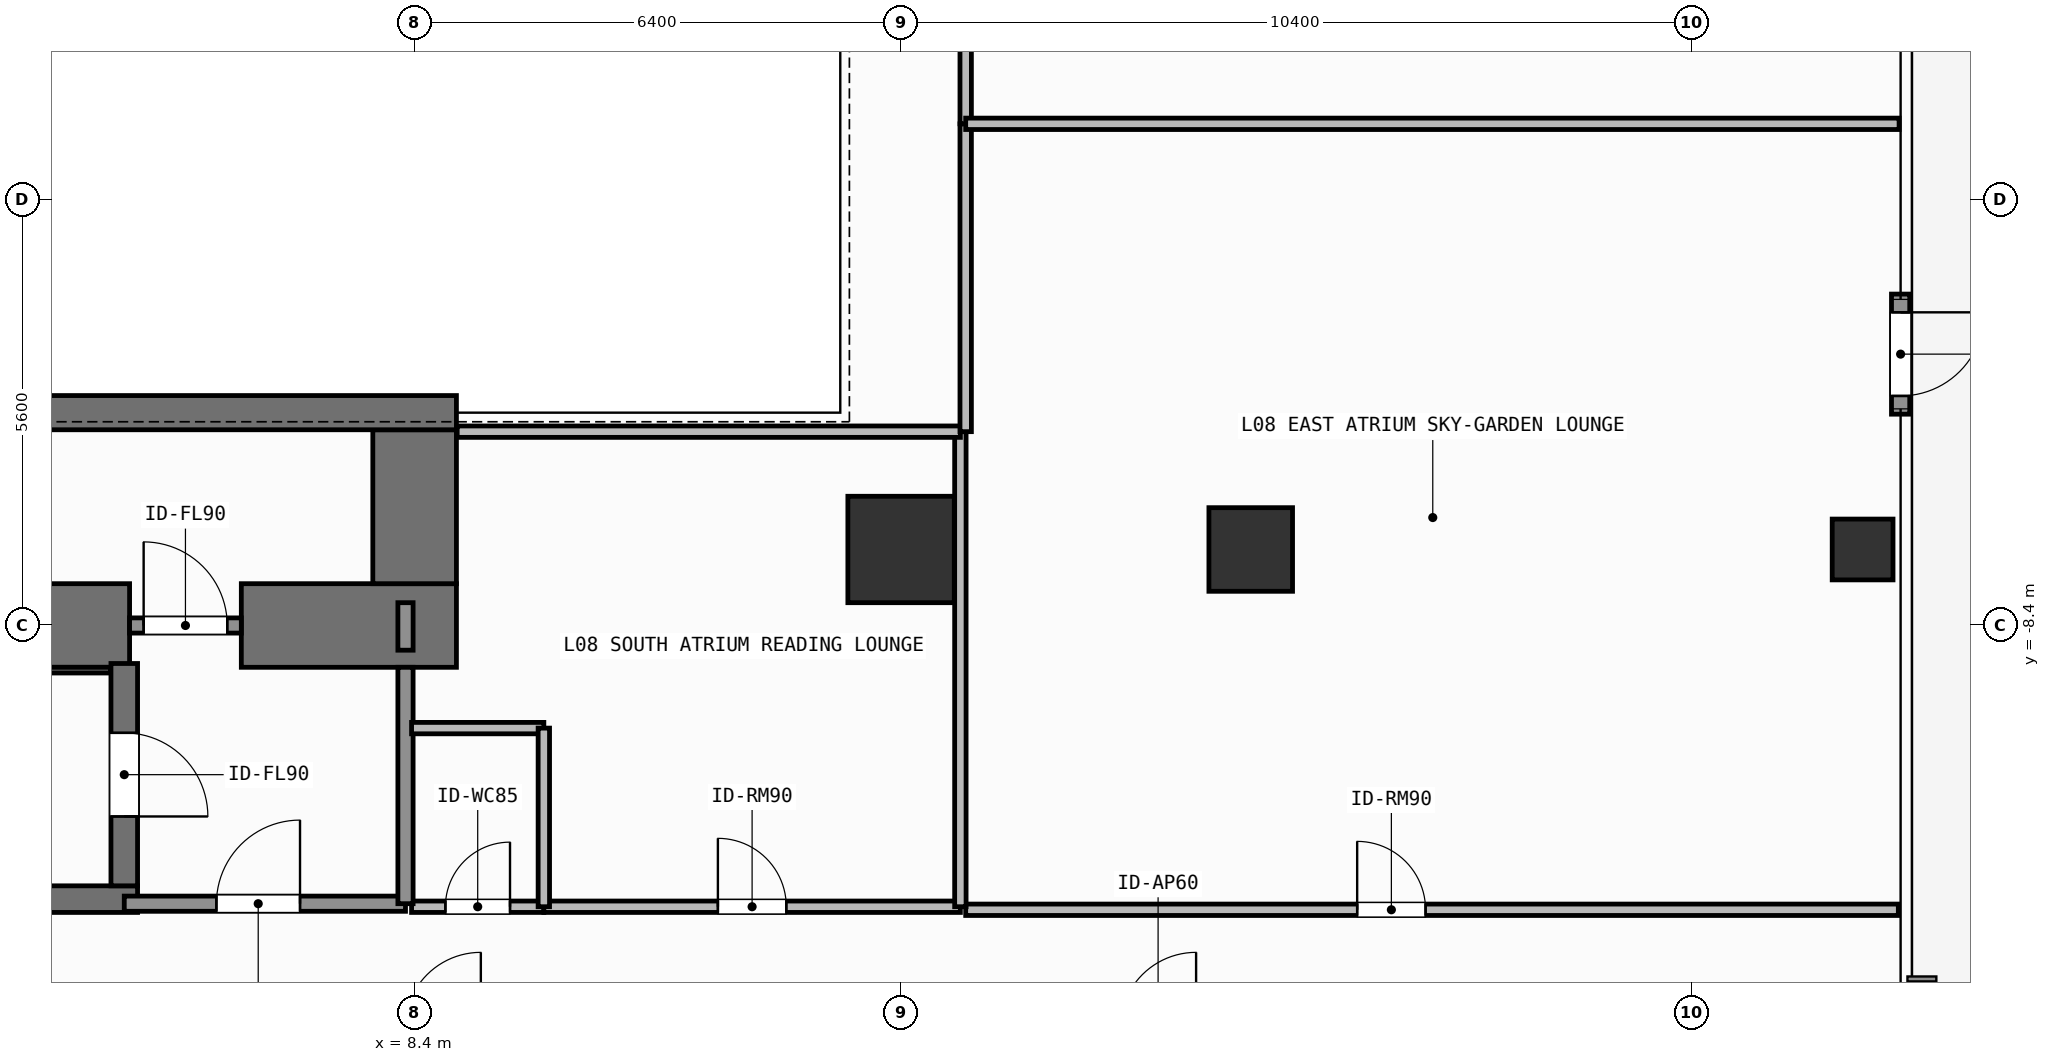
"""IFC4 building model, lengths in metres.
Left out: names, types, materials, properties, quantities, classifications, styles, units other than length and angle.
Written with IfcOpenShell. Run it as: python <this file> out.ifc"""

import sys

from ifc_helpers import new_model, si_unit, direction, frame, frame_2d, origin, origin_2d, place, context, subcontext, project, spatial, rectangle, hollow_rectangle, extrude, element, fill, save


model = new_model("IFC4")
c1 = context("Model", 3, precision=1e-05, world=origin(), true_north=direction((0.0, 1.0)))
c2 = subcontext(c1, "Body", "Model", "MODEL_VIEW")
j1 = project(units=[si_unit("LENGTHUNIT", "METRE"), si_unit("PLANEANGLEUNIT", "RADIAN")], contexts=[c1])
p1 = place(None, origin())
s1 = spatial("IfcSite", under=j1, at=p1, CompositionType="ELEMENT")
p2 = place(p1, origin())
s2 = spatial("IfcBuilding", under=s1, at=p2, CompositionType="ELEMENT")
p3 = place(p2, frame((0.0, 0.0, 30.6)))
s3 = spatial("IfcBuildingStorey", under=s2, at=p3, CompositionType="ELEMENT", Elevation=30.6)
p4 = place(p3, frame((-2.62, -8.4, 0.0), z_axis=(0.0, 0.0, 1.0), x_axis=(1.0, 0.0, 0.0)))
e1 = element("IfcWall", 1, at=p4, inside=s3, PredefinedType="SHEAR", context=c2, shape_type="SweptSolid", body=[
    extrude(rectangle(XDim=7.27, YDim=1.1, at=frame_2d((3.635, 0.0))), origin(), (0.0, 0.0, 1.0), 3.9),
])
p5 = place(p3, frame((6.12, -8.4, 0.0), z_axis=(0.0, 0.0, 1.0), x_axis=(1.0, 0.0, 0.0)))
e2 = element("IfcWall", 2, at=p5, inside=s3, PredefinedType="SHEAR", context=c2, shape_type="SweptSolid", body=[
    extrude(rectangle(XDim=2.83, YDim=1.1, at=frame_2d((1.415, 0.0))), origin(), (0.0, 0.0, 1.0), 3.9),
])
p6 = place(p3, frame((8.4, -7.85, 0.0), z_axis=(0.0, 0.0, 1.0), x_axis=(0.0, 1.0, 0.0)))
e3 = element("IfcWall", 3, at=p6, inside=s3, PredefinedType="SHEAR", context=c2, shape_type="SweptSolid", body=[
    extrude(rectangle(XDim=2.025, YDim=1.1, at=frame_2d((1.013, 0.0))), origin(), (0.0, 0.0, 1.0), 3.9),
])
p7 = place(p3, frame((3.045, -5.6, 0.0), z_axis=(0.0, 0.0, 1.0), x_axis=(1.0, 0.0, 0.0)))
e4 = element("IfcWall", 4, at=p7, inside=s3, PredefinedType="SHEAR", context=c2, shape_type="SweptSolid", body=[
    extrude(rectangle(XDim=5.905, YDim=0.45, at=frame_2d((2.953, 0.0))), origin(), (0.0, 0.0, 1.0), 3.9),
])
p8 = place(p3, frame((-2.555, -12.0, 0.0), z_axis=(0.0, 0.0, 1.0), x_axis=(1.0, 0.0, 0.0)))
e5 = element("IfcWall", 5, at=p8, inside=s3, PredefinedType="SHEAR", context=c2, shape_type="SweptSolid", body=[
    extrude(rectangle(XDim=7.31, YDim=0.35, at=frame_2d((3.655, 0.0))), origin(), (0.0, 0.0, 1.0), 3.9),
])
p9 = place(p3, frame((-2.2, -8.988, 0.0), z_axis=(0.0, 0.0, 1.0), x_axis=(1.0, 0.0, 0.0)))
e6 = element("IfcWall", 6, at=p9, inside=s3, PredefinedType="SHEAR", context=c2, shape_type="SweptSolid", body=[
    extrude(rectangle(XDim=6.6, YDim=0.075, at=frame_2d((3.3, 0.0))), origin(), (0.0, 0.0, 1.0), 3.9),
])
p10 = place(p3, frame((4.58, -8.9, 0.0), z_axis=(0.0, 0.0, 1.0), x_axis=(0.0, -1.0, 0.0)))
e7 = element("IfcWall", 7, at=p10, inside=s3, PredefinedType="SHEAR", context=c2, shape_type="SweptSolid", body=[
    extrude(rectangle(XDim=2.925, YDim=0.35, at=frame_2d((1.462, 0.0))), origin(), (0.0, 0.0, 1.0), 3.9),
])
p11 = place(p10, frame((0.913, 0.0, 0.0)))
e8 = element("IfcOpeningElement", 8, at=p11, cuts=e7, PredefinedType="OPENING", context=c2, shape_type="SweptSolid", body=[
    extrude(rectangle(XDim=1.1, YDim=2.15, at=frame_2d((0.55, 1.075))), frame((0.0, 0.185, 0.0), z_axis=(0.0, -1.0, 0.0), x_axis=(1.0, 0.0, 0.0)), (0.0, 0.0, 1.0), 0.37),
])
p12 = place(p3, frame((14.8, -7.4, 0.0), z_axis=(0.0, 0.0, 1.0), x_axis=(1.0, 0.0, 0.0)))
e9 = element("IfcColumn", 9, at=p12, inside=s3, PredefinedType="COLUMN", context=c2, shape_type="SweptSolid", body=[
    extrude(rectangle(XDim=1.4, YDim=1.4, at=origin_2d()), origin(), (0.0, 0.0, 1.0), 3.9),
])
p13 = place(p3, frame((19.4, -7.4, 0.0), z_axis=(0.0, 0.0, 1.0), x_axis=(1.0, 0.0, 0.0)))
e10 = element("IfcColumn", 10, at=p13, inside=s3, PredefinedType="COLUMN", context=c2, shape_type="SweptSolid", body=[
    extrude(rectangle(XDim=1.1, YDim=1.1, at=origin_2d()), origin(), (0.0, 0.0, 1.0), 3.9),
])
p14 = place(p3, frame((27.45, -7.4, 0.0), z_axis=(0.0, 0.0, 1.0), x_axis=(1.0, 0.0, 0.0)))
e11 = element("IfcColumn", 11, at=p14, inside=s3, PredefinedType="COLUMN", context=c2, shape_type="SweptSolid", body=[
    extrude(hollow_rectangle(XDim=0.8, YDim=0.8, WallThickness=0.036, at=origin_2d()), origin(), (0.0, 0.0, 1.0), 3.9),
])
p15 = place(p3, frame((27.95, -4.04, 0.0), z_axis=(0.0, 0.0, 1.0), x_axis=(0.0, -1.0, 0.0)))
e12 = element("IfcWall", 12, at=p15, inside=s3, PredefinedType="SOLIDWALL", context=c2, shape_type="SweptSolid", body=[
    extrude(rectangle(XDim=1.58, YDim=0.24, at=frame_2d((0.79, 0.0))), origin(), (0.0, 0.0, 1.0), 3.68),
])
p16 = place(p15, frame((0.24, 0.0, 0.0)))
e13 = element("IfcOpeningElement", 13, at=p16, cuts=e12, PredefinedType="OPENING", context=c2, shape_type="SweptSolid", body=[
    extrude(rectangle(XDim=1.1, YDim=2.2, at=frame_2d((0.55, 1.1))), frame((0.0, 0.13, 0.0), z_axis=(0.0, -1.0, 0.0), x_axis=(1.0, 0.0, 0.0)), (0.0, 0.0, 1.0), 0.26),
])
p17 = place(p3, frame((4.58, -12.06, 0.0), z_axis=(0.0, 0.0, 1.0), x_axis=(1.0, 0.0, 0.0)))
e14 = element("IfcWall", 14, at=p17, inside=s3, PredefinedType="SOLIDWALL", context=c2, shape_type="SweptSolid", body=[
    extrude(rectangle(XDim=3.7, YDim=0.2, at=frame_2d((1.85, 0.0))), origin(), (0.0, 0.0, 1.0), 3.68),
])
p18 = place(p17, frame((1.212, 0.0, 0.0)))
e15 = element("IfcOpeningElement", 15, at=p18, cuts=e14, PredefinedType="OPENING", context=c2, shape_type="SweptSolid", body=[
    extrude(rectangle(XDim=1.1, YDim=2.15, at=frame_2d((0.55, 1.075))), frame((0.0, 0.11, 0.0), z_axis=(0.0, -1.0, 0.0), x_axis=(1.0, 0.0, 0.0)), (0.0, 0.0, 1.0), 0.22),
])
p19 = place(p3, frame((4.65, -8.4, 0.0), z_axis=(0.0, 0.0, 1.0), x_axis=(1.0, 0.0, 0.0)))
e16 = element("IfcWall", 16, at=p19, inside=s3, PredefinedType="SOLIDWALL", context=c2, shape_type="SweptSolid", body=[
    extrude(rectangle(XDim=1.47, YDim=0.2, at=frame_2d((0.735, 0.0))), origin(), (0.0, 0.0, 1.0), 2.72),
])
p20 = place(p19, frame((0.185, 0.0, 0.0)))
e17 = element("IfcOpeningElement", 17, at=p20, cuts=e16, PredefinedType="OPENING", context=c2, shape_type="SweptSolid", body=[
    extrude(rectangle(XDim=1.1, YDim=2.15, at=frame_2d((0.55, 1.075))), frame((0.0, 0.11, 0.0), z_axis=(0.0, -1.0, 0.0), x_axis=(1.0, 0.0, 0.0)), (0.0, 0.0, 1.0), 0.22),
])
p21 = place(p3, frame((8.36, -12.1, 0.0), z_axis=(0.0, 0.0, 1.0), x_axis=(1.0, 0.0, 0.0)))
e18 = element("IfcWall", 18, at=p21, inside=s3, PredefinedType="PARTITIONING", context=c2, shape_type="SweptSolid", body=[
    extrude(rectangle(XDim=1.74, YDim=0.15, at=frame_2d((0.87, 0.0))), origin(), (0.0, 0.0, 1.0), 3.68),
])
p22 = place(p21, frame((0.445, 0.0, 0.0)))
e19 = element("IfcOpeningElement", 19, at=p22, cuts=e18, PredefinedType="OPENING", context=c2, shape_type="SweptSolid", body=[
    extrude(rectangle(XDim=0.85, YDim=2.1, at=frame_2d((0.425, 1.05))), frame((0.0, 0.085, 0.0), z_axis=(0.0, -1.0, 0.0), x_axis=(1.0, 0.0, 0.0)), (0.0, 0.0, 1.0), 0.17),
])
p23 = place(p3, frame((10.1, -12.1, 0.0), z_axis=(0.0, 0.0, 1.0), x_axis=(1.0, 0.0, 0.0)))
e20 = element("IfcWall", 20, at=p23, inside=s3, PredefinedType="PARTITIONING", context=c2, shape_type="SweptSolid", body=[
    extrude(rectangle(XDim=5.48, YDim=0.15, at=frame_2d((2.74, 0.0))), origin(), (0.0, 0.0, 1.0), 3.68),
])
p24 = place(p23, frame((2.29, 0.0, 0.0)))
e21 = element("IfcOpeningElement", 21, at=p24, cuts=e20, PredefinedType="OPENING", context=c2, shape_type="SweptSolid", body=[
    extrude(rectangle(XDim=0.9, YDim=2.1, at=frame_2d((0.45, 1.05))), frame((0.0, 0.085, 0.0), z_axis=(0.0, -1.0, 0.0), x_axis=(1.0, 0.0, 0.0)), (0.0, 0.0, 1.0), 0.17),
])
p25 = place(p3, frame((15.65, -12.14, 0.0), z_axis=(0.0, 0.0, 1.0), x_axis=(1.0, 0.0, 0.0)))
e22 = element("IfcWall", 22, at=p25, inside=s3, PredefinedType="PARTITIONING", context=c2, shape_type="SweptSolid", body=[
    extrude(rectangle(XDim=12.27, YDim=0.15, at=frame_2d((6.135, 0.0))), origin(), (0.0, 0.0, 1.0), 3.68),
])
p26 = place(p25, frame((5.15, 0.0, 0.0)))
e23 = element("IfcOpeningElement", 23, at=p26, cuts=e22, PredefinedType="OPENING", context=c2, shape_type="SweptSolid", body=[
    extrude(rectangle(XDim=0.9, YDim=2.1, at=frame_2d((0.45, 1.05))), frame((0.0, 0.085, 0.0), z_axis=(0.0, -1.0, 0.0), x_axis=(1.0, 0.0, 0.0)), (0.0, 0.0, 1.0), 0.17),
])
p27 = place(p3, frame((8.28, -12.06, 0.0), z_axis=(0.0, 0.0, 1.0), x_axis=(0.0, 1.0, 0.0)))
e24 = element("IfcWall", 24, at=p27, inside=s3, PredefinedType="SOLIDWALL", context=c2, shape_type="SweptSolid", body=[
    extrude(rectangle(XDim=3.11, YDim=0.2, at=frame_2d((1.555, 0.0))), origin(), (0.0, 0.0, 1.0), 3.68),
])
p28 = place(p3, frame((8.28, -8.725, 0.0), z_axis=(0.0, 0.0, 1.0), x_axis=(0.0, 1.0, 0.0)))
e25 = element("IfcWall", 25, at=p28, inside=s3, PredefinedType="SOLIDWALL", context=c2, shape_type="SweptSolid", body=[
    extrude(rectangle(XDim=0.625, YDim=0.2, at=frame_2d((0.312, 0.0))), origin(), (0.0, 0.0, 1.0), 3.68),
])
p29 = place(p3, frame((8.36, -9.75, 0.0), z_axis=(0.0, 0.0, 1.0), x_axis=(1.0, 0.0, 0.0)))
e26 = element("IfcWall", 26, at=p29, inside=s3, PredefinedType="PARTITIONING", context=c2, shape_type="SweptSolid", body=[
    extrude(rectangle(XDim=1.74, YDim=0.15, at=frame_2d((0.87, 0.0))), origin(), (0.0, 0.0, 1.0), 3.68),
])
p30 = place(p3, frame((10.1, -12.1, 0.0), z_axis=(0.0, 0.0, 1.0), x_axis=(0.0, 1.0, 0.0)))
e27 = element("IfcWall", 27, at=p30, inside=s3, PredefinedType="PARTITIONING", context=c2, shape_type="SweptSolid", body=[
    extrude(rectangle(XDim=2.35, YDim=0.15, at=frame_2d((1.175, 0.0))), origin(), (0.0, 0.0, 1.0), 3.68),
])
p31 = place(p3, frame((15.58, -12.1, 0.0), z_axis=(0.0, 0.0, 1.0), x_axis=(0.0, 1.0, 0.0)))
e28 = element("IfcWall", 28, at=p31, inside=s3, PredefinedType="PARTITIONING", context=c2, shape_type="SweptSolid", body=[
    extrude(rectangle(XDim=6.25, YDim=0.15, at=frame_2d((3.125, 0.0))), origin(), (0.0, 0.0, 1.0), 3.68),
])
p32 = place(p3, frame((8.96, -5.85, 0.0), z_axis=(0.0, 0.0, 1.0), x_axis=(1.0, 0.0, 0.0)))
e29 = element("IfcWall", 29, at=p32, inside=s3, PredefinedType="PARTITIONING", context=c2, shape_type="SweptSolid", body=[
    extrude(rectangle(XDim=6.62, YDim=0.15, at=frame_2d((3.31, 0.0))), origin(), (0.0, 0.0, 1.0), 3.68),
])
p33 = place(p3, frame((15.65, -5.85, 0.0), z_axis=(0.0, 0.0, 1.0), x_axis=(0.0, 1.0, 0.0)))
e30 = element("IfcWall", 30, at=p33, inside=s3, PredefinedType="PARTITIONING", context=c2, shape_type="SweptSolid", body=[
    extrude(rectangle(XDim=4.05, YDim=0.15, at=frame_2d((2.025, 0.0))), origin(), (0.0, 0.0, 1.0), 3.68),
])
p34 = place(p3, frame((15.65, -1.8, 0.0), z_axis=(0.0, 0.0, 1.0), x_axis=(0.0, 1.0, 0.0)))
e31 = element("IfcWall", 31, at=p34, inside=s3, PredefinedType="PARTITIONING", context=c2, shape_type="SweptSolid", body=[
    extrude(rectangle(XDim=7.65, YDim=0.15, at=frame_2d((3.825, 0.0))), origin(), (0.0, 0.0, 1.0), 3.68),
])
p35 = place(p3, frame((15.65, -1.8, 0.0), z_axis=(0.0, 0.0, 1.0), x_axis=(1.0, 0.0, 0.0)))
e32 = element("IfcWall", 32, at=p35, inside=s3, PredefinedType="PARTITIONING", context=c2, shape_type="SweptSolid", body=[
    extrude(rectangle(XDim=12.28, YDim=0.15, at=frame_2d((6.14, 0.0))), origin(), (0.0, 0.0, 1.0), 3.68),
])
p36 = place(p16, origin())
e33 = element("IfcDoor", 33, at=p36, inside=s3, OperationType="SINGLE_SWING_LEFT", PredefinedType="DOOR", context=c2, shape_type="SweptSolid", body=[
    extrude(rectangle(XDim=1.1, YDim=2.2, at=frame_2d((0.55, 1.1))), frame((0.0, 0.025, 0.0), z_axis=(0.0, -1.0, 0.0), x_axis=(1.0, 0.0, 0.0)), (0.0, 0.0, 1.0), 0.05),
])
fill(e13, e33)
p37 = place(p11, origin())
e34 = element("IfcDoor", 34, at=p37, inside=s3, OperationType="SINGLE_SWING_RIGHT", PredefinedType="DOOR", context=c2, shape_type="SweptSolid", body=[
    extrude(rectangle(XDim=1.1, YDim=2.15, at=frame_2d((0.55, 1.075))), frame((0.0, 0.025, 0.0), z_axis=(0.0, -1.0, 0.0), x_axis=(1.0, 0.0, 0.0)), (0.0, 0.0, 1.0), 0.05),
])
fill(e8, e34)
p38 = place(p18, origin())
e35 = element("IfcDoor", 35, at=p38, inside=s3, OperationType="SINGLE_SWING_RIGHT", PredefinedType="DOOR", context=c2, shape_type="SweptSolid", body=[
    extrude(rectangle(XDim=1.1, YDim=2.15, at=frame_2d((0.55, 1.075))), frame((0.0, 0.025, 0.0), z_axis=(0.0, -1.0, 0.0), x_axis=(1.0, 0.0, 0.0)), (0.0, 0.0, 1.0), 0.05),
])
fill(e15, e35)
p39 = place(p20, origin())
e36 = element("IfcDoor", 36, at=p39, inside=s3, OperationType="SINGLE_SWING_LEFT", PredefinedType="DOOR", context=c2, shape_type="SweptSolid", body=[
    extrude(rectangle(XDim=1.1, YDim=2.15, at=frame_2d((0.55, 1.075))), frame((0.0, 0.025, 0.0), z_axis=(0.0, -1.0, 0.0), x_axis=(1.0, 0.0, 0.0)), (0.0, 0.0, 1.0), 0.05),
])
fill(e17, e36)
p40 = place(p22, origin())
e37 = element("IfcDoor", 37, at=p40, inside=s3, OperationType="SINGLE_SWING_RIGHT", PredefinedType="DOOR", context=c2, shape_type="SweptSolid", body=[
    extrude(rectangle(XDim=0.85, YDim=2.1, at=frame_2d((0.425, 1.05))), frame((0.0, 0.025, 0.0), z_axis=(0.0, -1.0, 0.0), x_axis=(1.0, 0.0, 0.0)), (0.0, 0.0, 1.0), 0.05),
])
fill(e19, e37)
p41 = place(p24, origin())
e38 = element("IfcDoor", 38, at=p41, inside=s3, OperationType="SINGLE_SWING_LEFT", PredefinedType="DOOR", context=c2, shape_type="SweptSolid", body=[
    extrude(rectangle(XDim=0.9, YDim=2.1, at=frame_2d((0.45, 1.05))), frame((0.0, 0.025, 0.0), z_axis=(0.0, -1.0, 0.0), x_axis=(1.0, 0.0, 0.0)), (0.0, 0.0, 1.0), 0.05),
])
fill(e21, e38)
p42 = place(p26, origin())
e39 = element("IfcDoor", 39, at=p42, inside=s3, OperationType="SINGLE_SWING_LEFT", PredefinedType="DOOR", context=c2, shape_type="SweptSolid", body=[
    extrude(rectangle(XDim=0.9, YDim=2.1, at=frame_2d((0.45, 1.05))), frame((0.0, 0.025, 0.0), z_axis=(0.0, -1.0, 0.0), x_axis=(1.0, 0.0, 0.0)), (0.0, 0.0, 1.0), 0.05),
])
fill(e23, e39)
save(model, sys.argv[1])
